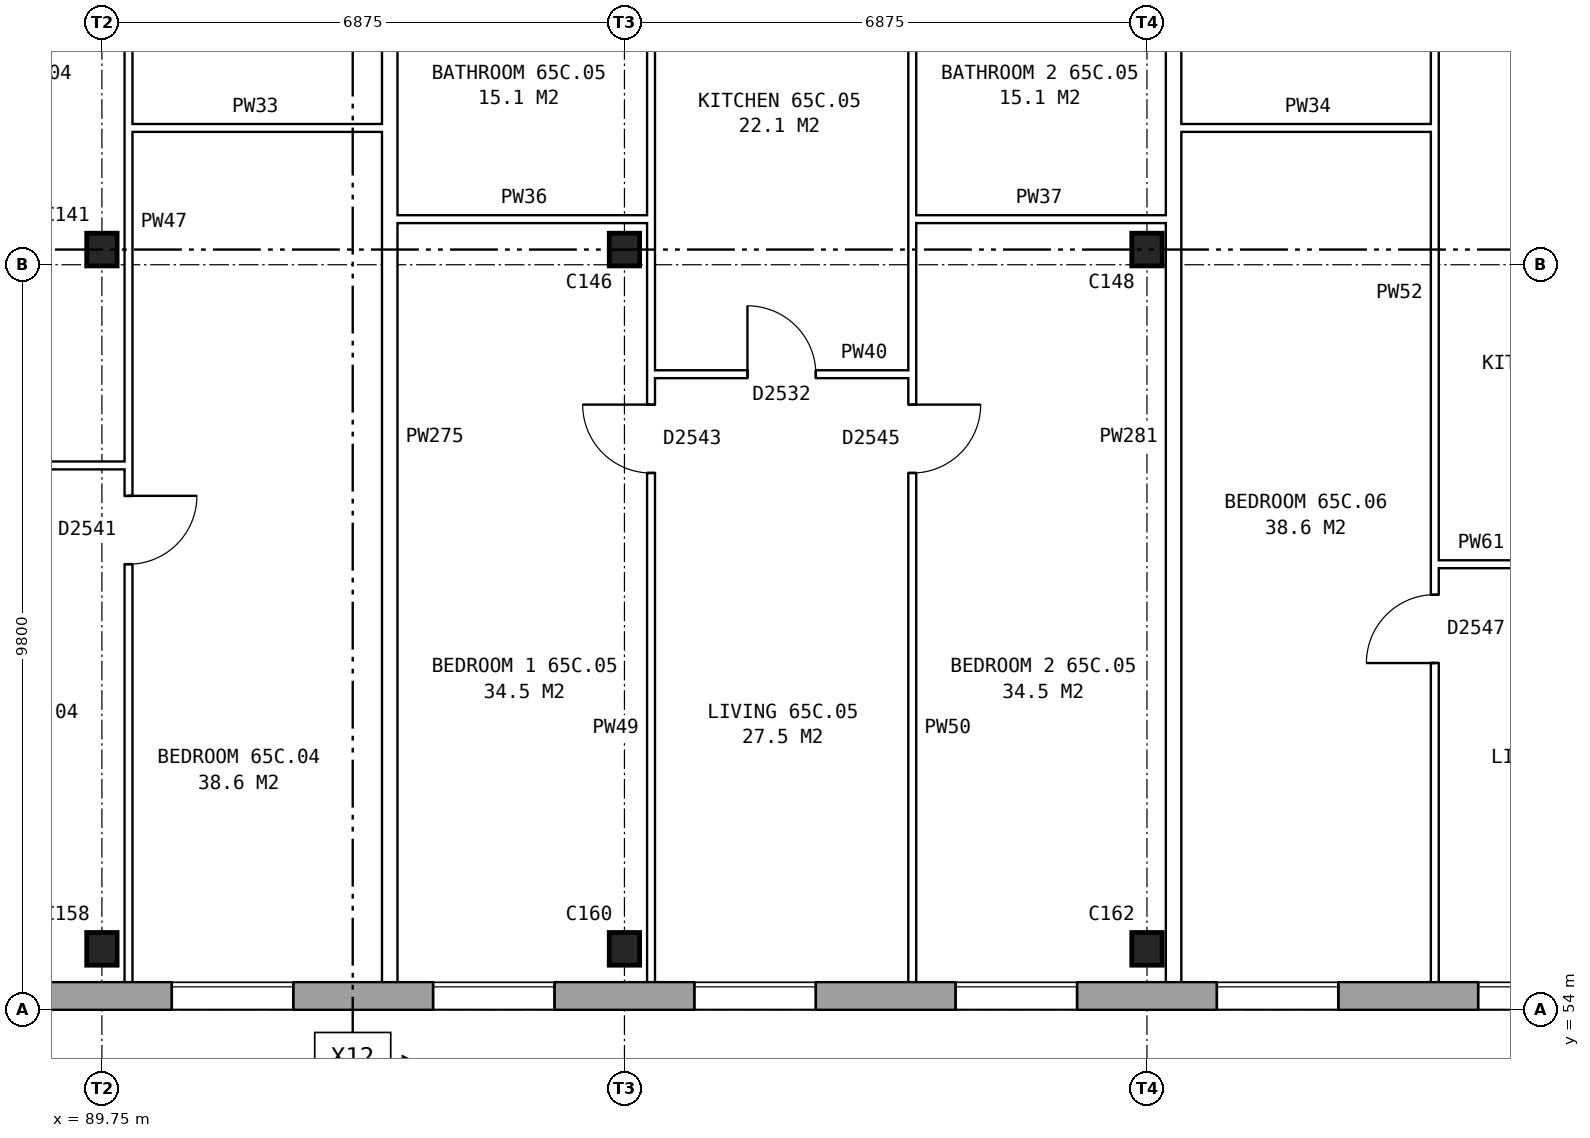
"""IFC4 building model, lengths in metres.
Left out: names, types, materials, properties, quantities, classifications, styles, units other than length and angle.
Written with IfcOpenShell. Run it as: python <this file> out.ifc"""

import sys

from ifc_helpers import new_model, si_unit, direction, frame, frame_2d, origin, origin_2d, place, context, subcontext, project, spatial, rectangle, i_section, extrude, element, fill, save


model = new_model("IFC4")
c1 = context("Model", 3, precision=1e-05, world=origin(), true_north=direction((0.0, 1.0)))
c2 = subcontext(c1, "Body", "Model", "MODEL_VIEW")
j1 = project(units=[si_unit("LENGTHUNIT", "METRE"), si_unit("PLANEANGLEUNIT", "RADIAN")], contexts=[c1])
p1 = place(None, origin())
s1 = spatial("IfcSite", under=j1, at=p1, CompositionType="ELEMENT")
p2 = place(p1, origin())
s2 = spatial("IfcBuilding", under=s1, at=p2, CompositionType="ELEMENT")
p3 = place(p2, frame((0.0, 0.0, 230.7)))
s3 = spatial("IfcBuildingStorey", under=s2, at=p3, CompositionType="ELEMENT", Elevation=230.7)
for number, where, z_axis, x_axis in (
    (1, (89.75, 54.8, 0.0), (0.0, 0.0, 1.0), (1.0, 0.0, 0.0)),
    (2, (96.625, 54.8, 0.0), (0.0, 0.0, 1.0), (1.0, 0.0, 0.0)),
    (3, (103.5, 54.8, 0.0), (0.0, 0.0, 1.0), (1.0, 0.0, 0.0)),
    (4, (89.75, 64.0, 0.0), (0.0, 0.0, 1.0), (1.0, 0.0, 0.0)),
    (5, (96.625, 64.0, 0.0), (0.0, 0.0, 1.0), (1.0, 0.0, 0.0)),
    (6, (103.5, 64.0, 0.0), (0.0, 0.0, 1.0), (1.0, 0.0, 0.0)),
):
    element("IfcColumn", number, at=place(p3, frame(where, z_axis=z_axis, x_axis=x_axis)), inside=s3, PredefinedType="COLUMN", context=c2, shape_type="SweptSolid", body=[
        extrude(i_section(OverallWidth=0.4, OverallDepth=0.43, WebThickness=0.028, FlangeThickness=0.04, at=origin_2d()), origin(), (0.0, 0.0, 1.0), 2.85),
    ])
p4 = place(p3, frame((75.95, 54.18, 0.0), z_axis=(0.0, 0.0, 1.0), x_axis=(1.0, 0.0, 0.0)))
e7 = element("IfcWall", 7, at=p4, inside=s3, PredefinedType="STANDARD", context=c2, shape_type="SweptSolid", body=[
    extrude(rectangle(XDim=55.1, YDim=0.36, at=frame_2d((27.55, 0.0))), origin(), (0.0, 0.0, 1.0), 2.85),
])
p5 = place(p4, frame((0.969, 0.0, 0.8)))
e8 = element("IfcOpeningElement", 8, at=p5, cuts=e7, PredefinedType="OPENING", context=c2, shape_type="SweptSolid", body=[
    extrude(rectangle(XDim=1.6, YDim=1.8, at=frame_2d((0.8, 0.9))), frame((0.0, 0.19, 0.0), z_axis=(0.0, -1.0, 0.0), x_axis=(1.0, 0.0, 0.0)), (0.0, 0.0, 1.0), 0.38),
])
p6 = place(p4, frame((4.406, 0.0, 0.8)))
e9 = element("IfcOpeningElement", 9, at=p6, cuts=e7, PredefinedType="OPENING", context=c2, shape_type="SweptSolid", body=[
    extrude(rectangle(XDim=1.6, YDim=1.8, at=frame_2d((0.8, 0.9))), frame((0.0, 0.19, 0.0), z_axis=(0.0, -1.0, 0.0), x_axis=(1.0, 0.0, 0.0)), (0.0, 0.0, 1.0), 0.38),
])
p7 = place(p4, frame((7.844, 0.0, 0.8)))
e10 = element("IfcOpeningElement", 10, at=p7, cuts=e7, PredefinedType="OPENING", context=c2, shape_type="SweptSolid", body=[
    extrude(rectangle(XDim=1.6, YDim=1.8, at=frame_2d((0.8, 0.9))), frame((0.0, 0.19, 0.0), z_axis=(0.0, -1.0, 0.0), x_axis=(1.0, 0.0, 0.0)), (0.0, 0.0, 1.0), 0.38),
])
p8 = place(p4, frame((11.281, 0.0, 0.8)))
e11 = element("IfcOpeningElement", 11, at=p8, cuts=e7, PredefinedType="OPENING", context=c2, shape_type="SweptSolid", body=[
    extrude(rectangle(XDim=1.6, YDim=1.8, at=frame_2d((0.8, 0.9))), frame((0.0, 0.19, 0.0), z_axis=(0.0, -1.0, 0.0), x_axis=(1.0, 0.0, 0.0)), (0.0, 0.0, 1.0), 0.38),
])
p9 = place(p4, frame((14.719, 0.0, 0.8)))
e12 = element("IfcOpeningElement", 12, at=p9, cuts=e7, PredefinedType="OPENING", context=c2, shape_type="SweptSolid", body=[
    extrude(rectangle(XDim=1.6, YDim=1.8, at=frame_2d((0.8, 0.9))), frame((0.0, 0.19, 0.0), z_axis=(0.0, -1.0, 0.0), x_axis=(1.0, 0.0, 0.0)), (0.0, 0.0, 1.0), 0.38),
])
p10 = place(p4, frame((18.156, 0.0, 0.8)))
e13 = element("IfcOpeningElement", 13, at=p10, cuts=e7, PredefinedType="OPENING", context=c2, shape_type="SweptSolid", body=[
    extrude(rectangle(XDim=1.6, YDim=1.8, at=frame_2d((0.8, 0.9))), frame((0.0, 0.19, 0.0), z_axis=(0.0, -1.0, 0.0), x_axis=(1.0, 0.0, 0.0)), (0.0, 0.0, 1.0), 0.38),
])
p11 = place(p4, frame((21.594, 0.0, 0.8)))
e14 = element("IfcOpeningElement", 14, at=p11, cuts=e7, PredefinedType="OPENING", context=c2, shape_type="SweptSolid", body=[
    extrude(rectangle(XDim=1.6, YDim=1.8, at=frame_2d((0.8, 0.9))), frame((0.0, 0.19, 0.0), z_axis=(0.0, -1.0, 0.0), x_axis=(1.0, 0.0, 0.0)), (0.0, 0.0, 1.0), 0.38),
])
p12 = place(p4, frame((25.031, 0.0, 0.8)))
e15 = element("IfcOpeningElement", 15, at=p12, cuts=e7, PredefinedType="OPENING", context=c2, shape_type="SweptSolid", body=[
    extrude(rectangle(XDim=1.6, YDim=1.8, at=frame_2d((0.8, 0.9))), frame((0.0, 0.19, 0.0), z_axis=(0.0, -1.0, 0.0), x_axis=(1.0, 0.0, 0.0)), (0.0, 0.0, 1.0), 0.38),
])
p13 = place(p4, frame((28.469, 0.0, 0.8)))
e16 = element("IfcOpeningElement", 16, at=p13, cuts=e7, PredefinedType="OPENING", context=c2, shape_type="SweptSolid", body=[
    extrude(rectangle(XDim=1.6, YDim=1.8, at=frame_2d((0.8, 0.9))), frame((0.0, 0.19, 0.0), z_axis=(0.0, -1.0, 0.0), x_axis=(1.0, 0.0, 0.0)), (0.0, 0.0, 1.0), 0.38),
])
p14 = place(p4, frame((31.906, 0.0, 0.8)))
e17 = element("IfcOpeningElement", 17, at=p14, cuts=e7, PredefinedType="OPENING", context=c2, shape_type="SweptSolid", body=[
    extrude(rectangle(XDim=1.6, YDim=1.8, at=frame_2d((0.8, 0.9))), frame((0.0, 0.19, 0.0), z_axis=(0.0, -1.0, 0.0), x_axis=(1.0, 0.0, 0.0)), (0.0, 0.0, 1.0), 0.38),
])
p15 = place(p4, frame((35.344, 0.0, 0.8)))
e18 = element("IfcOpeningElement", 18, at=p15, cuts=e7, PredefinedType="OPENING", context=c2, shape_type="SweptSolid", body=[
    extrude(rectangle(XDim=1.6, YDim=1.8, at=frame_2d((0.8, 0.9))), frame((0.0, 0.19, 0.0), z_axis=(0.0, -1.0, 0.0), x_axis=(1.0, 0.0, 0.0)), (0.0, 0.0, 1.0), 0.38),
])
p16 = place(p4, frame((38.781, 0.0, 0.8)))
e19 = element("IfcOpeningElement", 19, at=p16, cuts=e7, PredefinedType="OPENING", context=c2, shape_type="SweptSolid", body=[
    extrude(rectangle(XDim=1.6, YDim=1.8, at=frame_2d((0.8, 0.9))), frame((0.0, 0.19, 0.0), z_axis=(0.0, -1.0, 0.0), x_axis=(1.0, 0.0, 0.0)), (0.0, 0.0, 1.0), 0.38),
])
p17 = place(p4, frame((42.219, 0.0, 0.8)))
e20 = element("IfcOpeningElement", 20, at=p17, cuts=e7, PredefinedType="OPENING", context=c2, shape_type="SweptSolid", body=[
    extrude(rectangle(XDim=1.6, YDim=1.8, at=frame_2d((0.8, 0.9))), frame((0.0, 0.19, 0.0), z_axis=(0.0, -1.0, 0.0), x_axis=(1.0, 0.0, 0.0)), (0.0, 0.0, 1.0), 0.38),
])
p18 = place(p4, frame((45.656, 0.0, 0.8)))
e21 = element("IfcOpeningElement", 21, at=p18, cuts=e7, PredefinedType="OPENING", context=c2, shape_type="SweptSolid", body=[
    extrude(rectangle(XDim=1.6, YDim=1.8, at=frame_2d((0.8, 0.9))), frame((0.0, 0.19, 0.0), z_axis=(0.0, -1.0, 0.0), x_axis=(1.0, 0.0, 0.0)), (0.0, 0.0, 1.0), 0.38),
])
p19 = place(p4, frame((49.094, 0.0, 0.8)))
e22 = element("IfcOpeningElement", 22, at=p19, cuts=e7, PredefinedType="OPENING", context=c2, shape_type="SweptSolid", body=[
    extrude(rectangle(XDim=1.6, YDim=1.8, at=frame_2d((0.8, 0.9))), frame((0.0, 0.19, 0.0), z_axis=(0.0, -1.0, 0.0), x_axis=(1.0, 0.0, 0.0)), (0.0, 0.0, 1.0), 0.38),
])
p20 = place(p4, frame((52.531, 0.0, 0.8)))
e23 = element("IfcOpeningElement", 23, at=p20, cuts=e7, PredefinedType="OPENING", context=c2, shape_type="SweptSolid", body=[
    extrude(rectangle(XDim=1.6, YDim=1.8, at=frame_2d((0.8, 0.9))), frame((0.0, 0.19, 0.0), z_axis=(0.0, -1.0, 0.0), x_axis=(1.0, 0.0, 0.0)), (0.0, 0.0, 1.0), 0.38),
])
p21 = place(p3, frame((107.287, 59.86, 0.0), z_axis=(0.0, 0.0, 1.0), x_axis=(1.0, 0.0, 0.0)))
e24 = element("IfcWall", 24, at=p21, inside=s3, PredefinedType="PARTITIONING", context=c2, shape_type="SweptSolid", body=[
    extrude(rectangle(XDim=3.338, YDim=0.1, at=frame_2d((1.669, 0.0))), origin(), (0.0, 0.0, 1.0), 2.85),
])
p22 = place(p21, frame((1.219, 0.0, 0.0)))
e25 = element("IfcOpeningElement", 25, at=p22, cuts=e24, PredefinedType="OPENING", context=c2, shape_type="SweptSolid", body=[
    extrude(rectangle(XDim=0.9, YDim=2.1, at=frame_2d((0.45, 1.05))), frame((0.0, 0.06, 0.0), z_axis=(0.0, -1.0, 0.0), x_axis=(1.0, 0.0, 0.0)), (0.0, 0.0, 1.0), 0.12),
])
p23 = place(p3, frame((86.762, 61.16, 0.0), z_axis=(0.0, 0.0, 1.0), x_axis=(1.0, 0.0, 0.0)))
e26 = element("IfcWall", 26, at=p23, inside=s3, PredefinedType="PARTITIONING", context=c2, shape_type="SweptSolid", body=[
    extrude(rectangle(XDim=3.338, YDim=0.1, at=frame_2d((1.669, 0.0))), origin(), (0.0, 0.0, 1.0), 2.85),
])
p24 = place(p23, frame((1.219, 0.0, 0.0)))
e27 = element("IfcOpeningElement", 27, at=p24, cuts=e26, PredefinedType="OPENING", context=c2, shape_type="SweptSolid", body=[
    extrude(rectangle(XDim=0.9, YDim=2.1, at=frame_2d((0.45, 1.05))), frame((0.0, 0.06, 0.0), z_axis=(0.0, -1.0, 0.0), x_axis=(1.0, 0.0, 0.0)), (0.0, 0.0, 1.0), 0.12),
])
p25 = place(p3, frame((96.975, 62.36, 0.0), z_axis=(0.0, 0.0, 1.0), x_axis=(1.0, 0.0, 0.0)))
e28 = element("IfcWall", 28, at=p25, inside=s3, PredefinedType="PARTITIONING", context=c2, shape_type="SweptSolid", body=[
    extrude(rectangle(XDim=3.437, YDim=0.1, at=frame_2d((1.719, 0.0))), origin(), (0.0, 0.0, 1.0), 2.85),
])
p26 = place(p25, frame((1.269, 0.0, 0.0)))
e29 = element("IfcOpeningElement", 29, at=p26, cuts=e28, PredefinedType="OPENING", context=c2, shape_type="SweptSolid", body=[
    extrude(rectangle(XDim=0.9, YDim=2.1, at=frame_2d((0.45, 1.05))), frame((0.0, 0.06, 0.0), z_axis=(0.0, -1.0, 0.0), x_axis=(1.0, 0.0, 0.0)), (0.0, 0.0, 1.0), 0.12),
])
p27 = place(p3, frame((93.637, 64.4, 0.0), z_axis=(0.0, 0.0, 1.0), x_axis=(1.0, 0.0, 0.0)))
e30 = element("IfcWall", 30, at=p27, inside=s3, PredefinedType="PARTITIONING", context=c2, shape_type="SweptSolid", body=[
    extrude(rectangle(XDim=3.338, YDim=0.1, at=frame_2d((1.669, 0.0))), origin(), (0.0, 0.0, 1.0), 2.85),
])
p28 = place(p3, frame((100.412, 64.4, 0.0), z_axis=(0.0, 0.0, 1.0), x_axis=(1.0, 0.0, 0.0)))
e31 = element("IfcWall", 31, at=p28, inside=s3, PredefinedType="PARTITIONING", context=c2, shape_type="SweptSolid", body=[
    extrude(rectangle(XDim=3.338, YDim=0.1, at=frame_2d((1.669, 0.0))), origin(), (0.0, 0.0, 1.0), 2.85),
])
p29 = place(p3, frame((90.1, 65.6, 0.0), z_axis=(0.0, 0.0, 1.0), x_axis=(1.0, 0.0, 0.0)))
e32 = element("IfcWall", 32, at=p29, inside=s3, PredefinedType="PARTITIONING", context=c2, shape_type="SweptSolid", body=[
    extrude(rectangle(XDim=3.337, YDim=0.1, at=frame_2d((1.668, 0.0))), origin(), (0.0, 0.0, 1.0), 2.85),
])
p30 = place(p3, frame((103.95, 65.6, 0.0), z_axis=(0.0, 0.0, 1.0), x_axis=(1.0, 0.0, 0.0)))
e33 = element("IfcWall", 33, at=p30, inside=s3, PredefinedType="PARTITIONING", context=c2, shape_type="SweptSolid", body=[
    extrude(rectangle(XDim=3.337, YDim=0.1, at=frame_2d((1.668, 0.0))), origin(), (0.0, 0.0, 1.0), 2.85),
])
p31 = place(p3, frame((90.1, 54.36, 0.0), z_axis=(0.0, 0.0, 1.0), x_axis=(0.0, 1.0, 0.0)))
e34 = element("IfcWall", 34, at=p31, inside=s3, PredefinedType="PARTITIONING", context=c2, shape_type="SweptSolid", body=[
    extrude(rectangle(XDim=14.34, YDim=0.1, at=frame_2d((7.17, 0.0))), origin(), (0.0, 0.0, 1.0), 2.85),
])
p32 = place(p31, frame((5.5, 0.0, 0.0)))
e35 = element("IfcOpeningElement", 35, at=p32, cuts=e34, PredefinedType="OPENING", context=c2, shape_type="SweptSolid", body=[
    extrude(rectangle(XDim=0.9, YDim=2.1, at=frame_2d((0.45, 1.05))), frame((0.0, 0.06, 0.0), z_axis=(0.0, -1.0, 0.0), x_axis=(1.0, 0.0, 0.0)), (0.0, 0.0, 1.0), 0.12),
])
p33 = place(p31, frame((13.04, 0.0, 0.0)))
e36 = element("IfcOpeningElement", 36, at=p33, cuts=e34, PredefinedType="OPENING", context=c2, shape_type="SweptSolid", body=[
    extrude(rectangle(XDim=0.9, YDim=2.1, at=frame_2d((0.45, 1.05))), frame((0.0, 0.06, 0.0), z_axis=(0.0, -1.0, 0.0), x_axis=(1.0, 0.0, 0.0)), (0.0, 0.0, 1.0), 0.12),
])
p34 = place(p3, frame((93.537, 54.36, 0.0), z_axis=(0.0, 0.0, 1.0), x_axis=(0.0, 1.0, 0.0)))
e37 = element("IfcWall", 37, at=p34, inside=s3, PredefinedType="PARTITIONING", context=c2, shape_type="SweptSolid", body=[
    extrude(rectangle(XDim=14.34, YDim=0.2, at=frame_2d((7.17, 0.0))), origin(), (0.0, 0.0, 1.0), 2.85),
])
p35 = place(p3, frame((96.975, 54.36, 0.0), z_axis=(0.0, 0.0, 1.0), x_axis=(0.0, 1.0, 0.0)))
e38 = element("IfcWall", 38, at=p35, inside=s3, PredefinedType="PARTITIONING", context=c2, shape_type="SweptSolid", body=[
    extrude(rectangle(XDim=14.34, YDim=0.1, at=frame_2d((7.17, 0.0))), origin(), (0.0, 0.0, 1.0), 2.85),
])
p36 = place(p35, frame((6.7, 0.0, 0.0)))
e39 = element("IfcOpeningElement", 39, at=p36, cuts=e38, PredefinedType="OPENING", context=c2, shape_type="SweptSolid", body=[
    extrude(rectangle(XDim=0.9, YDim=2.1, at=frame_2d((0.45, 1.05))), frame((0.0, 0.06, 0.0), z_axis=(0.0, -1.0, 0.0), x_axis=(1.0, 0.0, 0.0)), (0.0, 0.0, 1.0), 0.12),
])
p37 = place(p35, frame((13.04, 0.0, 0.0)))
e40 = element("IfcOpeningElement", 40, at=p37, cuts=e38, PredefinedType="OPENING", context=c2, shape_type="SweptSolid", body=[
    extrude(rectangle(XDim=0.9, YDim=2.1, at=frame_2d((0.45, 1.05))), frame((0.0, 0.06, 0.0), z_axis=(0.0, -1.0, 0.0), x_axis=(1.0, 0.0, 0.0)), (0.0, 0.0, 1.0), 0.12),
])
p38 = place(p3, frame((100.412, 54.36, 0.0), z_axis=(0.0, 0.0, 1.0), x_axis=(0.0, 1.0, 0.0)))
e41 = element("IfcWall", 41, at=p38, inside=s3, PredefinedType="PARTITIONING", context=c2, shape_type="SweptSolid", body=[
    extrude(rectangle(XDim=14.34, YDim=0.1, at=frame_2d((7.17, 0.0))), origin(), (0.0, 0.0, 1.0), 2.85),
])
p39 = place(p38, frame((6.7, 0.0, 0.0)))
e42 = element("IfcOpeningElement", 42, at=p39, cuts=e41, PredefinedType="OPENING", context=c2, shape_type="SweptSolid", body=[
    extrude(rectangle(XDim=0.9, YDim=2.1, at=frame_2d((0.45, 1.05))), frame((0.0, 0.06, 0.0), z_axis=(0.0, -1.0, 0.0), x_axis=(1.0, 0.0, 0.0)), (0.0, 0.0, 1.0), 0.12),
])
p40 = place(p38, frame((13.04, 0.0, 0.0)))
e43 = element("IfcOpeningElement", 43, at=p40, cuts=e41, PredefinedType="OPENING", context=c2, shape_type="SweptSolid", body=[
    extrude(rectangle(XDim=0.9, YDim=2.1, at=frame_2d((0.45, 1.05))), frame((0.0, 0.06, 0.0), z_axis=(0.0, -1.0, 0.0), x_axis=(1.0, 0.0, 0.0)), (0.0, 0.0, 1.0), 0.12),
])
p41 = place(p3, frame((103.85, 54.36, 0.0), z_axis=(0.0, 0.0, 1.0), x_axis=(0.0, 1.0, 0.0)))
e44 = element("IfcWall", 44, at=p41, inside=s3, PredefinedType="PARTITIONING", context=c2, shape_type="SweptSolid", body=[
    extrude(rectangle(XDim=14.34, YDim=0.2, at=frame_2d((7.17, 0.0))), origin(), (0.0, 0.0, 1.0), 2.85),
])
p42 = place(p3, frame((107.287, 54.36, 0.0), z_axis=(0.0, 0.0, 1.0), x_axis=(0.0, 1.0, 0.0)))
e45 = element("IfcWall", 45, at=p42, inside=s3, PredefinedType="PARTITIONING", context=c2, shape_type="SweptSolid", body=[
    extrude(rectangle(XDim=14.34, YDim=0.1, at=frame_2d((7.17, 0.0))), origin(), (0.0, 0.0, 1.0), 2.85),
])
p43 = place(p42, frame((4.2, 0.0, 0.0)))
e46 = element("IfcOpeningElement", 46, at=p43, cuts=e45, PredefinedType="OPENING", context=c2, shape_type="SweptSolid", body=[
    extrude(rectangle(XDim=0.9, YDim=2.1, at=frame_2d((0.45, 1.05))), frame((0.0, 0.06, 0.0), z_axis=(0.0, -1.0, 0.0), x_axis=(1.0, 0.0, 0.0)), (0.0, 0.0, 1.0), 0.12),
])
p44 = place(p42, frame((13.04, 0.0, 0.0)))
e47 = element("IfcOpeningElement", 47, at=p44, cuts=e45, PredefinedType="OPENING", context=c2, shape_type="SweptSolid", body=[
    extrude(rectangle(XDim=0.9, YDim=2.1, at=frame_2d((0.45, 1.05))), frame((0.0, 0.06, 0.0), z_axis=(0.0, -1.0, 0.0), x_axis=(1.0, 0.0, 0.0)), (0.0, 0.0, 1.0), 0.12),
])
p45 = place(p9, origin())
e48 = element("IfcWindow", 48, at=p45, inside=s3, PartitioningType="SINGLE_PANEL", PredefinedType="WINDOW", context=c2, shape_type="SweptSolid", body=[
    extrude(rectangle(XDim=1.6, YDim=1.8, at=frame_2d((0.8, 0.9))), frame((0.0, 0.15, 0.0), z_axis=(0.0, -1.0, 0.0), x_axis=(1.0, 0.0, 0.0)), (0.0, 0.0, 1.0), 0.06),
])
fill(e12, e48)
p46 = place(p10, origin())
e49 = element("IfcWindow", 49, at=p46, inside=s3, PartitioningType="SINGLE_PANEL", PredefinedType="WINDOW", context=c2, shape_type="SweptSolid", body=[
    extrude(rectangle(XDim=1.6, YDim=1.8, at=frame_2d((0.8, 0.9))), frame((0.0, 0.15, 0.0), z_axis=(0.0, -1.0, 0.0), x_axis=(1.0, 0.0, 0.0)), (0.0, 0.0, 1.0), 0.06),
])
fill(e13, e49)
p47 = place(p11, origin())
e50 = element("IfcWindow", 50, at=p47, inside=s3, PartitioningType="SINGLE_PANEL", PredefinedType="WINDOW", context=c2, shape_type="SweptSolid", body=[
    extrude(rectangle(XDim=1.6, YDim=1.8, at=frame_2d((0.8, 0.9))), frame((0.0, 0.15, 0.0), z_axis=(0.0, -1.0, 0.0), x_axis=(1.0, 0.0, 0.0)), (0.0, 0.0, 1.0), 0.06),
])
fill(e14, e50)
p48 = place(p12, origin())
e51 = element("IfcWindow", 51, at=p48, inside=s3, PartitioningType="SINGLE_PANEL", PredefinedType="WINDOW", context=c2, shape_type="SweptSolid", body=[
    extrude(rectangle(XDim=1.6, YDim=1.8, at=frame_2d((0.8, 0.9))), frame((0.0, 0.15, 0.0), z_axis=(0.0, -1.0, 0.0), x_axis=(1.0, 0.0, 0.0)), (0.0, 0.0, 1.0), 0.06),
])
fill(e15, e51)
p49 = place(p13, origin())
e52 = element("IfcWindow", 52, at=p49, inside=s3, PartitioningType="SINGLE_PANEL", PredefinedType="WINDOW", context=c2, shape_type="SweptSolid", body=[
    extrude(rectangle(XDim=1.6, YDim=1.8, at=frame_2d((0.8, 0.9))), frame((0.0, 0.15, 0.0), z_axis=(0.0, -1.0, 0.0), x_axis=(1.0, 0.0, 0.0)), (0.0, 0.0, 1.0), 0.06),
])
fill(e16, e52)
p50 = place(p14, origin())
e53 = element("IfcWindow", 53, at=p50, inside=s3, PartitioningType="SINGLE_PANEL", PredefinedType="WINDOW", context=c2, shape_type="SweptSolid", body=[
    extrude(rectangle(XDim=1.6, YDim=1.8, at=frame_2d((0.8, 0.9))), frame((0.0, 0.15, 0.0), z_axis=(0.0, -1.0, 0.0), x_axis=(1.0, 0.0, 0.0)), (0.0, 0.0, 1.0), 0.06),
])
fill(e17, e53)
p51 = place(p32, frame((0.9, 0.0, 0.0), z_axis=(0.0, 0.0, 1.0), x_axis=(-1.0, 0.0, 0.0)))
e54 = element("IfcDoor", 54, at=p51, inside=s3, OperationType="SINGLE_SWING_LEFT", PredefinedType="DOOR", context=c2, shape_type="SweptSolid", body=[
    extrude(rectangle(XDim=0.9, YDim=2.1, at=frame_2d((0.45, 1.05))), frame((0.0, 0.025, 0.0), z_axis=(0.0, -1.0, 0.0), x_axis=(1.0, 0.0, 0.0)), (0.0, 0.0, 1.0), 0.05),
])
fill(e35, e54)
p52 = place(p36, origin())
e55 = element("IfcDoor", 55, at=p52, inside=s3, OperationType="SINGLE_SWING_RIGHT", PredefinedType="DOOR", context=c2, shape_type="SweptSolid", body=[
    extrude(rectangle(XDim=0.9, YDim=2.1, at=frame_2d((0.45, 1.05))), frame((0.0, 0.025, 0.0), z_axis=(0.0, -1.0, 0.0), x_axis=(1.0, 0.0, 0.0)), (0.0, 0.0, 1.0), 0.05),
])
fill(e39, e55)
p53 = place(p39, frame((0.9, 0.0, 0.0), z_axis=(0.0, 0.0, 1.0), x_axis=(-1.0, 0.0, 0.0)))
e56 = element("IfcDoor", 56, at=p53, inside=s3, OperationType="SINGLE_SWING_LEFT", PredefinedType="DOOR", context=c2, shape_type="SweptSolid", body=[
    extrude(rectangle(XDim=0.9, YDim=2.1, at=frame_2d((0.45, 1.05))), frame((0.0, 0.025, 0.0), z_axis=(0.0, -1.0, 0.0), x_axis=(1.0, 0.0, 0.0)), (0.0, 0.0, 1.0), 0.05),
])
fill(e42, e56)
p54 = place(p26, origin())
e57 = element("IfcDoor", 57, at=p54, inside=s3, OperationType="SINGLE_SWING_LEFT", PredefinedType="DOOR", context=c2, shape_type="SweptSolid", body=[
    extrude(rectangle(XDim=0.9, YDim=2.1, at=frame_2d((0.45, 1.05))), frame((0.0, 0.025, 0.0), z_axis=(0.0, -1.0, 0.0), x_axis=(1.0, 0.0, 0.0)), (0.0, 0.0, 1.0), 0.05),
])
fill(e29, e57)
p55 = place(p43, origin())
e58 = element("IfcDoor", 58, at=p55, inside=s3, OperationType="SINGLE_SWING_LEFT", PredefinedType="DOOR", context=c2, shape_type="SweptSolid", body=[
    extrude(rectangle(XDim=0.9, YDim=2.1, at=frame_2d((0.45, 1.05))), frame((0.0, 0.025, 0.0), z_axis=(0.0, -1.0, 0.0), x_axis=(1.0, 0.0, 0.0)), (0.0, 0.0, 1.0), 0.05),
])
fill(e46, e58)
save(model, sys.argv[1])
